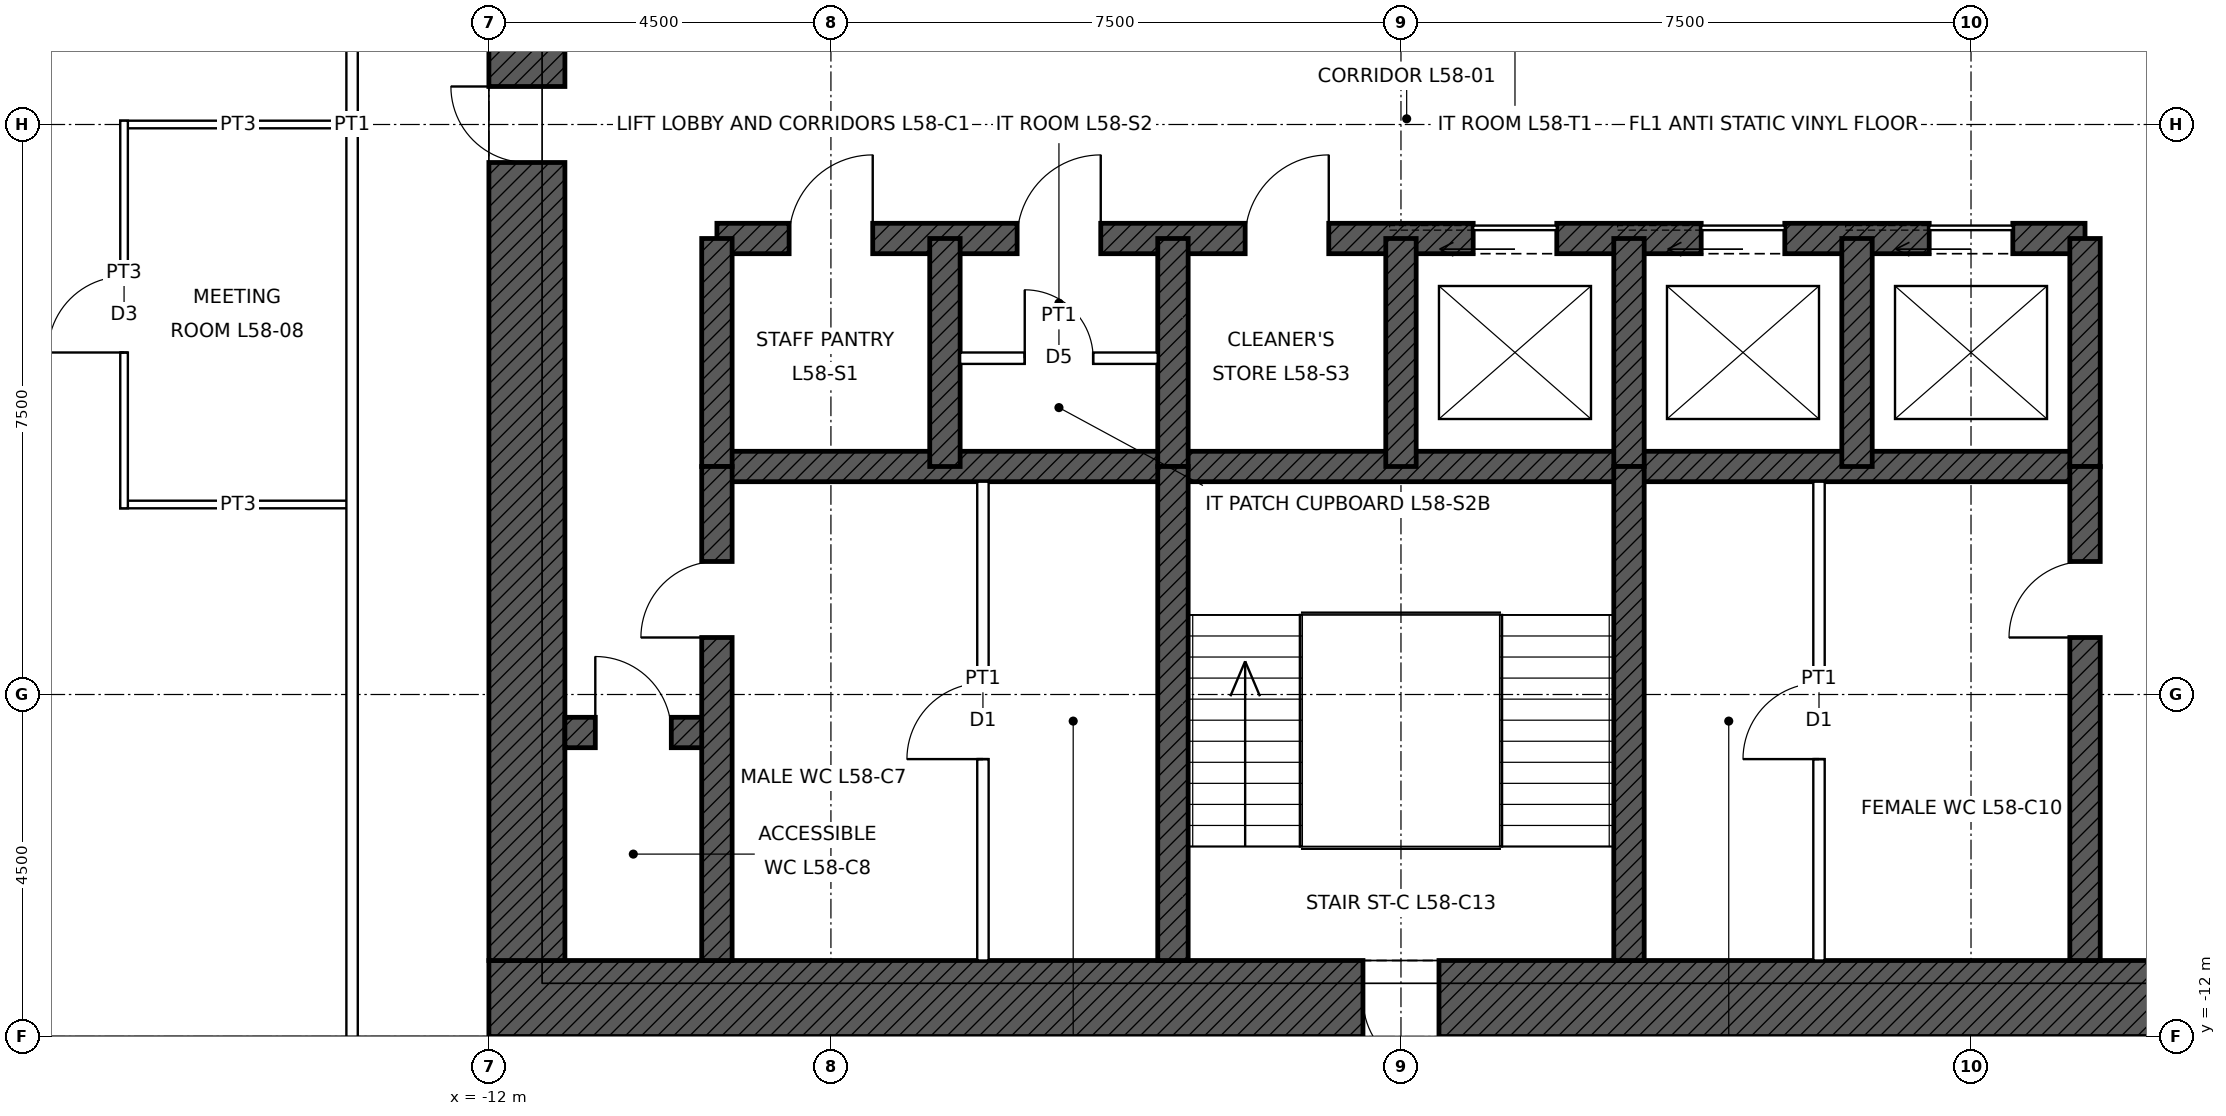
"""IFC4 building model, lengths in metres.
Left out: names, types, materials, properties, quantities, classifications, styles, units other than length and angle.
Written with IfcOpenShell. Run it as: python <this file> out.ifc"""

import sys

from ifc_helpers import new_model, si_unit, direction, frame, frame_2d, origin, place, context, subcontext, project, spatial, rectangle, extrude, element, fill, save


model = new_model("IFC4")
c1 = context("Model", 3, precision=1e-05, world=origin(), true_north=direction((0.0, 1.0)))
c2 = subcontext(c1, "Body", "Model", "MODEL_VIEW")
j1 = project(units=[si_unit("LENGTHUNIT", "METRE"), si_unit("PLANEANGLEUNIT", "RADIAN")], contexts=[c1])
p1 = place(None, origin())
s1 = spatial("IfcSite", under=j1, at=p1, CompositionType="ELEMENT")
p2 = place(p1, origin())
s2 = spatial("IfcBuilding", under=s1, at=p2, CompositionType="ELEMENT")
p3 = place(p2, frame((0.0, 0.0, 267.9)))
s3 = spatial("IfcBuildingStorey", under=s2, at=p3, CompositionType="ELEMENT", Elevation=267.9)
p4 = place(p3, frame((12.0, -11.5, 0.0), z_axis=(0.0, 0.0, 1.0), x_axis=(-1.0, 0.0, 0.0)))
e1 = element("IfcWall", 1, at=p4, inside=s3, PredefinedType="SHEAR", context=c2, shape_type="SweptSolid", body=[
    extrude(rectangle(XDim=24.0, YDim=1.0, at=frame_2d((12.0, 0.0))), origin(), (0.0, 0.0, 1.0), 4.0),
])
p5 = place(p4, frame((11.5, 0.0, 0.0)))
e2 = element("IfcOpeningElement", 2, at=p5, cuts=e1, PredefinedType="OPENING", context=c2, shape_type="SweptSolid", body=[
    extrude(rectangle(XDim=1.0, YDim=2.1, at=frame_2d((0.5, 1.05))), frame((0.0, 0.51, 0.0), z_axis=(0.0, -1.0, 0.0), x_axis=(1.0, 0.0, 0.0)), (0.0, 0.0, 1.0), 1.02),
])
p6 = place(p4, frame((1.0, 0.0, 0.0)))
e3 = element("IfcOpeningElement", 3, at=p6, cuts=e1, PredefinedType="OPENING", context=c2, shape_type="SweptSolid", body=[
    extrude(rectangle(XDim=1.0, YDim=2.4, at=frame_2d((0.5, 1.2))), frame((0.0, 0.51, 0.0), z_axis=(0.0, -1.0, 0.0), x_axis=(1.0, 0.0, 0.0)), (0.0, 0.0, 1.0), 1.02),
])
p7 = place(p3, frame((-11.5, -11.0, 0.0), z_axis=(0.0, 0.0, 1.0), x_axis=(0.0, 1.0, 0.0)))
e4 = element("IfcWall", 4, at=p7, inside=s3, PredefinedType="SHEAR", context=c2, shape_type="SweptSolid", body=[
    extrude(rectangle(XDim=22.0, YDim=1.0, at=frame_2d((11.0, 0.0))), origin(), (0.0, 0.0, 1.0), 4.0),
])
p8 = place(p7, frame((10.5, 0.0, 0.0)))
e5 = element("IfcOpeningElement", 5, at=p8, cuts=e4, PredefinedType="OPENING", context=c2, shape_type="SweptSolid", body=[
    extrude(rectangle(XDim=1.0, YDim=2.4, at=frame_2d((0.5, 1.2))), frame((0.0, 0.51, 0.0), z_axis=(0.0, -1.0, 0.0), x_axis=(1.0, 0.0, 0.0)), (0.0, 0.0, 1.0), 1.02),
])
p9 = place(p3, frame((-9.0, -1.5, 0.0), z_axis=(0.0, 0.0, 1.0), x_axis=(1.0, 0.0, 0.0)))
e6 = element("IfcWall", 6, at=p9, inside=s3, PredefinedType="SHEAR", context=c2, shape_type="SweptSolid", body=[
    extrude(rectangle(XDim=18.0, YDim=0.4, at=frame_2d((9.0, 0.0))), origin(), (0.0, 0.0, 1.0), 4.0),
])
p10 = place(p9, frame((9.95, 0.0, 0.0)))
e7 = element("IfcOpeningElement", 7, at=p10, cuts=e6, PredefinedType="OPENING", context=c2, shape_type="SweptSolid", body=[
    extrude(rectangle(XDim=1.1, YDim=2.1, at=frame_2d((0.55, 1.05))), frame((0.0, 0.21, 0.0), z_axis=(0.0, -1.0, 0.0), x_axis=(1.0, 0.0, 0.0)), (0.0, 0.0, 1.0), 0.42),
])
p11 = place(p9, frame((12.95, 0.0, 0.0)))
e8 = element("IfcOpeningElement", 8, at=p11, cuts=e6, PredefinedType="OPENING", context=c2, shape_type="SweptSolid", body=[
    extrude(rectangle(XDim=1.1, YDim=2.1, at=frame_2d((0.55, 1.05))), frame((0.0, 0.21, 0.0), z_axis=(0.0, -1.0, 0.0), x_axis=(1.0, 0.0, 0.0)), (0.0, 0.0, 1.0), 0.42),
])
p12 = place(p9, frame((15.95, 0.0, 0.0)))
e9 = element("IfcOpeningElement", 9, at=p12, cuts=e6, PredefinedType="OPENING", context=c2, shape_type="SweptSolid", body=[
    extrude(rectangle(XDim=1.1, YDim=2.1, at=frame_2d((0.55, 1.05))), frame((0.0, 0.21, 0.0), z_axis=(0.0, -1.0, 0.0), x_axis=(1.0, 0.0, 0.0)), (0.0, 0.0, 1.0), 0.42),
])
p13 = place(p9, frame((0.95, 0.0, 0.0)))
e10 = element("IfcOpeningElement", 10, at=p13, cuts=e6, PredefinedType="OPENING", context=c2, shape_type="SweptSolid", body=[
    extrude(rectangle(XDim=1.1, YDim=2.1, at=frame_2d((0.55, 1.05))), frame((0.0, 0.21, 0.0), z_axis=(0.0, -1.0, 0.0), x_axis=(1.0, 0.0, 0.0)), (0.0, 0.0, 1.0), 0.42),
])
p14 = place(p9, frame((3.95, 0.0, 0.0)))
e11 = element("IfcOpeningElement", 11, at=p14, cuts=e6, PredefinedType="OPENING", context=c2, shape_type="SweptSolid", body=[
    extrude(rectangle(XDim=1.1, YDim=2.1, at=frame_2d((0.55, 1.05))), frame((0.0, 0.21, 0.0), z_axis=(0.0, -1.0, 0.0), x_axis=(1.0, 0.0, 0.0)), (0.0, 0.0, 1.0), 0.42),
])
p15 = place(p9, frame((6.95, 0.0, 0.0)))
e12 = element("IfcOpeningElement", 12, at=p15, cuts=e6, PredefinedType="OPENING", context=c2, shape_type="SweptSolid", body=[
    extrude(rectangle(XDim=1.1, YDim=2.1, at=frame_2d((0.55, 1.05))), frame((0.0, 0.21, 0.0), z_axis=(0.0, -1.0, 0.0), x_axis=(1.0, 0.0, 0.0)), (0.0, 0.0, 1.0), 0.42),
])
p16 = place(p3, frame((-9.0, -4.5, 0.0), z_axis=(0.0, 0.0, 1.0), x_axis=(1.0, 0.0, 0.0)))
e13 = element("IfcWall", 13, at=p16, inside=s3, PredefinedType="SHEAR", context=c2, shape_type="SweptSolid", body=[
    extrude(rectangle(XDim=18.0, YDim=0.4, at=frame_2d((9.0, 0.0))), origin(), (0.0, 0.0, 1.0), 4.0),
])
p17 = place(p3, frame((-11.0, -8.0, 0.0), z_axis=(0.0, 0.0, 1.0), x_axis=(1.0, 0.0, 0.0)))
e14 = element("IfcWall", 14, at=p17, inside=s3, PredefinedType="SHEAR", context=c2, shape_type="SweptSolid", body=[
    extrude(rectangle(XDim=2.0, YDim=0.4, at=frame_2d((1.0, 0.0))), origin(), (0.0, 0.0, 1.0), 4.0),
])
p18 = place(p17, frame((0.4, 0.0, 0.0)))
e15 = element("IfcOpeningElement", 15, at=p18, cuts=e14, PredefinedType="OPENING", context=c2, shape_type="SweptSolid", body=[
    extrude(rectangle(XDim=1.0, YDim=2.1, at=frame_2d((0.5, 1.05))), frame((0.0, 0.21, 0.0), z_axis=(0.0, -1.0, 0.0), x_axis=(1.0, 0.0, 0.0)), (0.0, 0.0, 1.0), 0.42),
])
for number, where, z_axis, x_axis in (
    (16, (-9.0, -4.5, 0.0), (0.0, 0.0, 1.0), (0.0, 1.0, 0.0)),
    (17, (9.0, -4.5, 0.0), (0.0, 0.0, 1.0), (0.0, 1.0, 0.0)),
    (18, (-6.0, -4.5, 0.0), (0.0, 0.0, 1.0), (0.0, 1.0, 0.0)),
    (19, (-3.0, -4.5, 0.0), (0.0, 0.0, 1.0), (0.0, 1.0, 0.0)),
    (20, (0.0, -4.5, 0.0), (0.0, 0.0, 1.0), (0.0, 1.0, 0.0)),
    (21, (3.0, -4.5, 0.0), (0.0, 0.0, 1.0), (0.0, 1.0, 0.0)),
    (22, (6.0, -4.5, 0.0), (0.0, 0.0, 1.0), (0.0, 1.0, 0.0)),
):
    element("IfcWall", number, at=place(p3, frame(where, z_axis=z_axis, x_axis=x_axis)), inside=s3, PredefinedType="SHEAR", context=c2, shape_type="SweptSolid", body=[
        extrude(rectangle(XDim=3.0, YDim=0.4, at=frame_2d((1.5, 0.0))), origin(), (0.0, 0.0, 1.0), 4.0),
    ])
p19 = place(p3, frame((-9.0, -11.0, 0.0), z_axis=(0.0, 0.0, 1.0), x_axis=(0.0, 1.0, 0.0)))
e23 = element("IfcWall", 23, at=p19, inside=s3, PredefinedType="SHEAR", context=c2, shape_type="SweptSolid", body=[
    extrude(rectangle(XDim=6.5, YDim=0.4, at=frame_2d((3.25, 0.0))), origin(), (0.0, 0.0, 1.0), 4.0),
])
p20 = place(p19, frame((4.25, 0.0, 0.0)))
e24 = element("IfcOpeningElement", 24, at=p20, cuts=e23, PredefinedType="OPENING", context=c2, shape_type="SweptSolid", body=[
    extrude(rectangle(XDim=1.0, YDim=2.1, at=frame_2d((0.5, 1.05))), frame((0.0, 0.21, 0.0), z_axis=(0.0, -1.0, 0.0), x_axis=(1.0, 0.0, 0.0)), (0.0, 0.0, 1.0), 0.42),
])
p21 = place(p3, frame((9.0, -11.0, 0.0), z_axis=(0.0, 0.0, 1.0), x_axis=(0.0, 1.0, 0.0)))
e25 = element("IfcWall", 25, at=p21, inside=s3, PredefinedType="SHEAR", context=c2, shape_type="SweptSolid", body=[
    extrude(rectangle(XDim=6.5, YDim=0.4, at=frame_2d((3.25, 0.0))), origin(), (0.0, 0.0, 1.0), 4.0),
])
p22 = place(p21, frame((4.25, 0.0, 0.0)))
e26 = element("IfcOpeningElement", 26, at=p22, cuts=e25, PredefinedType="OPENING", context=c2, shape_type="SweptSolid", body=[
    extrude(rectangle(XDim=1.0, YDim=2.1, at=frame_2d((0.5, 1.05))), frame((0.0, 0.21, 0.0), z_axis=(0.0, -1.0, 0.0), x_axis=(1.0, 0.0, 0.0)), (0.0, 0.0, 1.0), 0.42),
])
for number, where, z_axis, x_axis in (
    (27, (-3.0, -11.0, 0.0), (0.0, 0.0, 1.0), (0.0, 1.0, 0.0)),
    (28, (3.0, -11.0, 0.0), (0.0, 0.0, 1.0), (0.0, 1.0, 0.0)),
):
    element("IfcWall", number, at=place(p3, frame(where, z_axis=z_axis, x_axis=x_axis)), inside=s3, PredefinedType="SHEAR", context=c2, shape_type="SweptSolid", body=[
        extrude(rectangle(XDim=6.5, YDim=0.4, at=frame_2d((3.25, 0.0))), origin(), (0.0, 0.0, 1.0), 4.0),
    ])
p23 = place(p3, frame((-16.85, -5.0, 0.0), z_axis=(0.0, 0.0, 1.0), x_axis=(1.0, 0.0, 0.0)))
e29 = element("IfcWall", 29, at=p23, inside=s3, PredefinedType="PARTITIONING", context=c2, shape_type="SweptSolid", body=[
    extrude(rectangle(XDim=3.1, YDim=0.1, at=frame_2d((1.55, 0.0))), origin(), (0.0, 0.0, 1.0), 3.85),
])
p24 = place(p3, frame((-16.85, 0.0, 0.0), z_axis=(0.0, 0.0, 1.0), x_axis=(1.0, 0.0, 0.0)))
e30 = element("IfcWall", 30, at=p24, inside=s3, PredefinedType="PARTITIONING", context=c2, shape_type="SweptSolid", body=[
    extrude(rectangle(XDim=3.1, YDim=0.1, at=frame_2d((1.55, 0.0))), origin(), (0.0, 0.0, 1.0), 3.243),
])
p25 = place(p3, frame((-16.8, -5.05, 0.0), z_axis=(0.0, 0.0, 1.0), x_axis=(0.0, 1.0, 0.0)))
e31 = element("IfcWall", 31, at=p25, inside=s3, PredefinedType="PARTITIONING", context=c2, shape_type="SweptSolid", body=[
    extrude(rectangle(XDim=5.1, YDim=0.1, at=frame_2d((2.55, 0.0))), origin(), (0.0, 0.0, 1.0), 3.85),
])
p26 = place(p25, frame((2.05, 0.0, 0.0)))
e32 = element("IfcOpeningElement", 32, at=p26, cuts=e31, PredefinedType="OPENING", context=c2, shape_type="SweptSolid", body=[
    extrude(rectangle(XDim=1.0, YDim=2.1, at=frame_2d((0.5, 1.05))), frame((0.0, 0.06, 0.0), z_axis=(0.0, -1.0, 0.0), x_axis=(1.0, 0.0, 0.0)), (0.0, 0.0, 1.0), 0.12),
])
p27 = place(p3, frame((-13.8, -13.875, 0.0), z_axis=(0.0, 0.0, 1.0), x_axis=(0.0, 1.0, 0.0)))
e33 = element("IfcWall", 33, at=p27, inside=s3, PredefinedType="PARTITIONING", context=c2, shape_type="SweptSolid", body=[
    extrude(rectangle(XDim=27.75, YDim=0.15, at=frame_2d((13.875, 0.0))), origin(), (0.0, 0.0, 1.0), 3.85),
])
p28 = place(p3, frame((-5.5, -11.0, 0.0), z_axis=(0.0, 0.0, 1.0), x_axis=(0.0, 1.0, 0.0)))
e34 = element("IfcWall", 34, at=p28, inside=s3, PredefinedType="PARTITIONING", context=c2, shape_type="SweptSolid", body=[
    extrude(rectangle(XDim=6.3, YDim=0.15, at=frame_2d((3.15, 0.0))), origin(), (0.0, 0.0, 1.0), 3.75),
])
p29 = place(p28, frame((2.65, 0.0, 0.0)))
e35 = element("IfcOpeningElement", 35, at=p29, cuts=e34, PredefinedType="OPENING", context=c2, shape_type="SweptSolid", body=[
    extrude(rectangle(XDim=1.0, YDim=2.1, at=frame_2d((0.5, 1.05))), frame((0.0, 0.085, 0.0), z_axis=(0.0, -1.0, 0.0), x_axis=(1.0, 0.0, 0.0)), (0.0, 0.0, 1.0), 0.17),
])
p30 = place(p3, frame((5.5, -11.0, 0.0), z_axis=(0.0, 0.0, 1.0), x_axis=(0.0, 1.0, 0.0)))
e36 = element("IfcWall", 36, at=p30, inside=s3, PredefinedType="PARTITIONING", context=c2, shape_type="SweptSolid", body=[
    extrude(rectangle(XDim=6.3, YDim=0.15, at=frame_2d((3.15, 0.0))), origin(), (0.0, 0.0, 1.0), 3.75),
])
p31 = place(p30, frame((2.65, 0.0, 0.0)))
e37 = element("IfcOpeningElement", 37, at=p31, cuts=e36, PredefinedType="OPENING", context=c2, shape_type="SweptSolid", body=[
    extrude(rectangle(XDim=1.0, YDim=2.1, at=frame_2d((0.5, 1.05))), frame((0.0, 0.085, 0.0), z_axis=(0.0, -1.0, 0.0), x_axis=(1.0, 0.0, 0.0)), (0.0, 0.0, 1.0), 0.17),
])
p32 = place(p3, frame((-5.8, -3.075, 0.0), z_axis=(0.0, 0.0, 1.0), x_axis=(1.0, 0.0, 0.0)))
e38 = element("IfcWall", 38, at=p32, inside=s3, PredefinedType="PARTITIONING", context=c2, shape_type="SweptSolid", body=[
    extrude(rectangle(XDim=2.6, YDim=0.15, at=frame_2d((1.3, 0.0))), origin(), (0.0, 0.0, 1.0), 3.75),
])
p33 = place(p32, frame((0.85, 0.0, 0.0)))
e39 = element("IfcOpeningElement", 39, at=p33, cuts=e38, PredefinedType="OPENING", context=c2, shape_type="SweptSolid", body=[
    extrude(rectangle(XDim=0.9, YDim=2.1, at=frame_2d((0.45, 1.05))), frame((0.0, 0.085, 0.0), z_axis=(0.0, -1.0, 0.0), x_axis=(1.0, 0.0, 0.0)), (0.0, 0.0, 1.0), 0.17),
])
p34 = place(p5, origin())
e40 = element("IfcDoor", 40, at=p34, inside=s3, OperationType="SINGLE_SWING_LEFT", PredefinedType="DOOR", context=c2, shape_type="SweptSolid", body=[
    extrude(rectangle(XDim=1.0, YDim=2.1, at=frame_2d((0.5, 1.05))), frame((0.0, 0.485, 0.0), z_axis=(0.0, -1.0, 0.0), x_axis=(1.0, 0.0, 0.0)), (0.0, 0.0, 1.0), 0.05),
])
fill(e2, e40)
p35 = place(p8, origin())
e41 = element("IfcDoor", 41, at=p35, inside=s3, OperationType="SINGLE_SWING_RIGHT", PredefinedType="DOOR", context=c2, shape_type="SweptSolid", body=[
    extrude(rectangle(XDim=1.0, YDim=2.4, at=frame_2d((0.5, 1.2))), frame((0.0, 0.485, 0.0), z_axis=(0.0, -1.0, 0.0), x_axis=(1.0, 0.0, 0.0)), (0.0, 0.0, 1.0), 0.05),
])
fill(e5, e41)
p36 = place(p20, origin())
e42 = element("IfcDoor", 42, at=p36, inside=s3, OperationType="SINGLE_SWING_LEFT", PredefinedType="DOOR", context=c2, shape_type="SweptSolid", body=[
    extrude(rectangle(XDim=1.0, YDim=2.1, at=frame_2d((0.5, 1.05))), frame((0.0, 0.025, 0.0), z_axis=(0.0, -1.0, 0.0), x_axis=(1.0, 0.0, 0.0)), (0.0, 0.0, 1.0), 0.05),
])
fill(e24, e42)
p37 = place(p22, origin())
e43 = element("IfcDoor", 43, at=p37, inside=s3, OperationType="SINGLE_SWING_LEFT", PredefinedType="DOOR", context=c2, shape_type="SweptSolid", body=[
    extrude(rectangle(XDim=1.0, YDim=2.1, at=frame_2d((0.5, 1.05))), frame((0.0, 0.025, 0.0), z_axis=(0.0, -1.0, 0.0), x_axis=(1.0, 0.0, 0.0)), (0.0, 0.0, 1.0), 0.05),
])
fill(e26, e43)
p38 = place(p18, origin())
e44 = element("IfcDoor", 44, at=p38, inside=s3, OperationType="SINGLE_SWING_LEFT", PredefinedType="DOOR", context=c2, shape_type="SweptSolid", body=[
    extrude(rectangle(XDim=1.0, YDim=2.1, at=frame_2d((0.5, 1.05))), frame((0.0, 0.025, 0.0), z_axis=(0.0, -1.0, 0.0), x_axis=(1.0, 0.0, 0.0)), (0.0, 0.0, 1.0), 0.05),
])
fill(e15, e44)
p39 = place(p10, origin())
e45 = element("IfcDoor", 45, at=p39, inside=s3, OperationType="SLIDING_TO_LEFT", PredefinedType="DOOR", context=c2, shape_type="SweptSolid", body=[
    extrude(rectangle(XDim=1.1, YDim=2.1, at=frame_2d((0.55, 1.05))), frame((0.0, 0.025, 0.0), z_axis=(0.0, -1.0, 0.0), x_axis=(1.0, 0.0, 0.0)), (0.0, 0.0, 1.0), 0.05),
])
fill(e7, e45)
p40 = place(p11, origin())
e46 = element("IfcDoor", 46, at=p40, inside=s3, OperationType="SLIDING_TO_LEFT", PredefinedType="DOOR", context=c2, shape_type="SweptSolid", body=[
    extrude(rectangle(XDim=1.1, YDim=2.1, at=frame_2d((0.55, 1.05))), frame((0.0, 0.025, 0.0), z_axis=(0.0, -1.0, 0.0), x_axis=(1.0, 0.0, 0.0)), (0.0, 0.0, 1.0), 0.05),
])
fill(e8, e46)
p41 = place(p12, origin())
e47 = element("IfcDoor", 47, at=p41, inside=s3, OperationType="SLIDING_TO_LEFT", PredefinedType="DOOR", context=c2, shape_type="SweptSolid", body=[
    extrude(rectangle(XDim=1.1, YDim=2.1, at=frame_2d((0.55, 1.05))), frame((0.0, 0.025, 0.0), z_axis=(0.0, -1.0, 0.0), x_axis=(1.0, 0.0, 0.0)), (0.0, 0.0, 1.0), 0.05),
])
fill(e9, e47)
p42 = place(p29, origin())
e48 = element("IfcDoor", 48, at=p42, inside=s3, OperationType="SINGLE_SWING_LEFT", PredefinedType="DOOR", context=c2, shape_type="SweptSolid", body=[
    extrude(rectangle(XDim=1.0, YDim=2.1, at=frame_2d((0.5, 1.05))), frame((0.0, 0.025, 0.0), z_axis=(0.0, -1.0, 0.0), x_axis=(1.0, 0.0, 0.0)), (0.0, 0.0, 1.0), 0.05),
])
fill(e35, e48)
p43 = place(p31, origin())
e49 = element("IfcDoor", 49, at=p43, inside=s3, OperationType="SINGLE_SWING_LEFT", PredefinedType="DOOR", context=c2, shape_type="SweptSolid", body=[
    extrude(rectangle(XDim=1.0, YDim=2.1, at=frame_2d((0.5, 1.05))), frame((0.0, 0.025, 0.0), z_axis=(0.0, -1.0, 0.0), x_axis=(1.0, 0.0, 0.0)), (0.0, 0.0, 1.0), 0.05),
])
fill(e37, e49)
p44 = place(p13, origin())
e50 = element("IfcDoor", 50, at=p44, inside=s3, OperationType="SINGLE_SWING_RIGHT", PredefinedType="DOOR", context=c2, shape_type="SweptSolid", body=[
    extrude(rectangle(XDim=1.1, YDim=2.1, at=frame_2d((0.55, 1.05))), frame((0.0, 0.025, 0.0), z_axis=(0.0, -1.0, 0.0), x_axis=(1.0, 0.0, 0.0)), (0.0, 0.0, 1.0), 0.05),
])
fill(e10, e50)
p45 = place(p14, origin())
e51 = element("IfcDoor", 51, at=p45, inside=s3, OperationType="SINGLE_SWING_RIGHT", PredefinedType="DOOR", context=c2, shape_type="SweptSolid", body=[
    extrude(rectangle(XDim=1.1, YDim=2.1, at=frame_2d((0.55, 1.05))), frame((0.0, 0.025, 0.0), z_axis=(0.0, -1.0, 0.0), x_axis=(1.0, 0.0, 0.0)), (0.0, 0.0, 1.0), 0.05),
])
fill(e11, e51)
p46 = place(p33, origin())
e52 = element("IfcDoor", 52, at=p46, inside=s3, OperationType="SINGLE_SWING_LEFT", PredefinedType="DOOR", context=c2, shape_type="SweptSolid", body=[
    extrude(rectangle(XDim=0.9, YDim=2.1, at=frame_2d((0.45, 1.05))), frame((0.0, 0.025, 0.0), z_axis=(0.0, -1.0, 0.0), x_axis=(1.0, 0.0, 0.0)), (0.0, 0.0, 1.0), 0.05),
])
fill(e39, e52)
p47 = place(p15, origin())
e53 = element("IfcDoor", 53, at=p47, inside=s3, OperationType="SINGLE_SWING_RIGHT", PredefinedType="DOOR", context=c2, shape_type="SweptSolid", body=[
    extrude(rectangle(XDim=1.1, YDim=2.1, at=frame_2d((0.55, 1.05))), frame((0.0, 0.025, 0.0), z_axis=(0.0, -1.0, 0.0), x_axis=(1.0, 0.0, 0.0)), (0.0, 0.0, 1.0), 0.05),
])
fill(e12, e53)
p48 = place(p26, origin())
e54 = element("IfcDoor", 54, at=p48, inside=s3, OperationType="SINGLE_SWING_LEFT", PredefinedType="DOOR", context=c2, shape_type="SweptSolid", body=[
    extrude(rectangle(XDim=1.0, YDim=2.1, at=frame_2d((0.5, 1.05))), frame((0.0, 0.025, 0.0), z_axis=(0.0, -1.0, 0.0), x_axis=(1.0, 0.0, 0.0)), (0.0, 0.0, 1.0), 0.05),
])
fill(e32, e54)
save(model, sys.argv[1])
